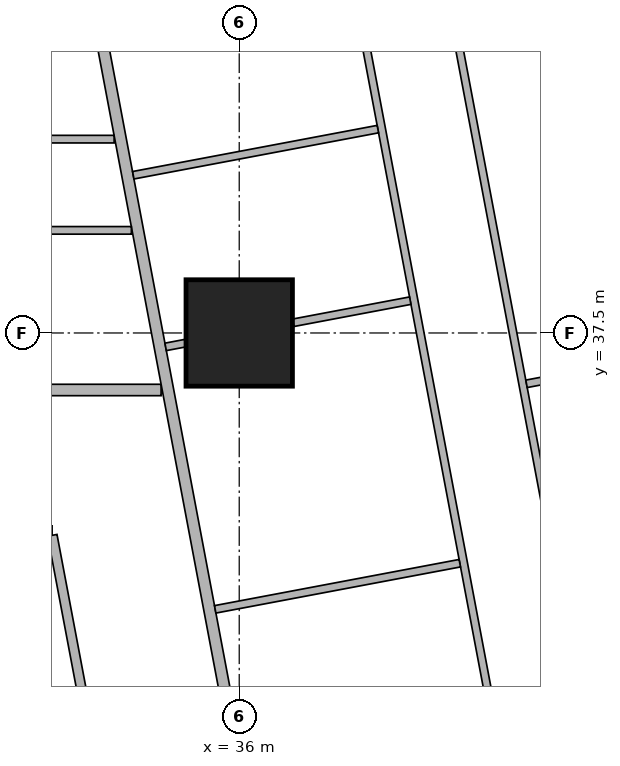
"""IFC4 building model, lengths in metres.
Left out: names, types, materials, properties, quantities, classifications, styles, units other than length and angle.
Written with IfcOpenShell. Run it as: python <this file> out.ifc"""

import sys

from ifc_helpers import new_model, si_unit, direction, frame, frame_2d, origin, origin_2d, place, context, subcontext, project, spatial, rectangle, extrude, element, fill, save


model = new_model("IFC4")
c1 = context("Model", 3, precision=1e-05, world=origin(), true_north=direction((0.0, 1.0)))
c2 = subcontext(c1, "Body", "Model", "MODEL_VIEW")
j1 = project(units=[si_unit("LENGTHUNIT", "METRE"), si_unit("PLANEANGLEUNIT", "RADIAN")], contexts=[c1])
p1 = place(None, origin())
s1 = spatial("IfcSite", under=j1, at=p1, CompositionType="ELEMENT")
p2 = place(p1, origin())
s2 = spatial("IfcBuilding", under=s1, at=p2, CompositionType="ELEMENT")
p3 = place(p2, frame((0.0, 0.0, 262.85)))
s3 = spatial("IfcBuildingStorey", under=s2, at=p3, CompositionType="ELEMENT", Elevation=262.85)
p4 = place(p3, frame((36.0, 37.5, 0.0), z_axis=(0.0, 0.0, 1.0), x_axis=(1.0, 0.0, 0.0)))
e1 = element("IfcColumn", 1, at=p4, inside=s3, PredefinedType="COLUMN", context=c2, shape_type="SweptSolid", body=[
    extrude(rectangle(XDim=1.4, YDim=1.4, at=origin_2d()), origin(), (0.0, 0.0, 1.0), 3.75),
])
p5 = place(p3, frame((29.501, 36.75, 0.0), z_axis=(0.0, 0.0, 1.0), x_axis=(1.0, 0.0, 0.0)))
e2 = element("IfcWall", 2, at=p5, inside=s3, PredefinedType="SOLIDWALL", context=c2, shape_type="SweptSolid", body=[
    extrude(rectangle(XDim=5.471, YDim=0.15, at=frame_2d((2.735, 0.0))), origin(), (0.0, 0.0, 1.0), 3.5),
])
p6 = place(p3, frame((34.036, 42.186, 0.0), z_axis=(0.0, 0.0, 1.0), x_axis=(0.185593518645, -0.9826266055, 0.0)))
e3 = element("IfcWall", 3, at=p6, inside=s3, PredefinedType="SOLIDWALL", context=c2, shape_type="SweptSolid", body=[
    extrude(rectangle(XDim=35.961, YDim=0.15, at=frame_2d((17.98, 0.0))), origin(), (0.0, 0.0, 1.0), 2.5),
])
p7 = place(p6, frame((15.529, 0.0, 0.0)))
e4 = element("IfcOpeningElement", 4, at=p7, cuts=e3, PredefinedType="OPENING", context=c2, shape_type="SweptSolid", body=[
    extrude(rectangle(XDim=1.0, YDim=2.1, at=frame_2d((0.5, 1.05))), frame((0.0, 0.085, 0.0), z_axis=(0.0, -1.0, 0.0), x_axis=(1.0, 0.0, 0.0)), (0.0, 0.0, 1.0), 0.17),
])
p8 = place(p6, frame((19.345, 0.0, 0.0)))
e5 = element("IfcOpeningElement", 5, at=p8, cuts=e3, PredefinedType="OPENING", context=c2, shape_type="SweptSolid", body=[
    extrude(rectangle(XDim=1.0, YDim=2.1, at=frame_2d((0.5, 1.05))), frame((0.0, 0.085, 0.0), z_axis=(0.0, -1.0, 0.0), x_axis=(1.0, 0.0, 0.0)), (0.0, 0.0, 1.0), 0.17),
])
p9 = place(p6, frame((30.594, 0.0, 0.0)))
e6 = element("IfcOpeningElement", 6, at=p9, cuts=e3, PredefinedType="OPENING", context=c2, shape_type="SweptSolid", body=[
    extrude(rectangle(XDim=1.0, YDim=2.1, at=frame_2d((0.5, 1.05))), frame((0.0, 0.085, 0.0), z_axis=(0.0, -1.0, 0.0), x_axis=(1.0, 0.0, 0.0)), (0.0, 0.0, 1.0), 0.17),
])
p10 = place(p3, frame((38.744, 42.045, 0.0), z_axis=(0.0, 0.0, 1.0), x_axis=(0.185614085367, -0.982622720739, 0.0)))
e7 = element("IfcWall", 7, at=p10, inside=s3, PredefinedType="PARTITIONING", context=c2, shape_type="SweptSolid", body=[
    extrude(rectangle(XDim=12.898, YDim=0.1, at=frame_2d((6.449, 0.0))), origin(), (0.0, 0.0, 1.0), 2.5),
])
p11 = place(p10, frame((11.848, 0.0, 0.0)))
e8 = element("IfcOpeningElement", 8, at=p11, cuts=e7, PredefinedType="OPENING", context=c2, shape_type="SweptSolid", body=[
    extrude(rectangle(XDim=0.9, YDim=2.1, at=frame_2d((0.45, 1.05))), frame((0.0, 0.06, 0.0), z_axis=(0.0, -1.0, 0.0), x_axis=(1.0, 0.0, 0.0)), (0.0, 0.0, 1.0), 0.12),
])
p12 = place(p10, frame((8.191, 0.0, 0.0)))
e9 = element("IfcOpeningElement", 9, at=p12, cuts=e7, PredefinedType="OPENING", context=c2, shape_type="SweptSolid", body=[
    extrude(rectangle(XDim=0.9, YDim=2.1, at=frame_2d((0.45, 1.05))), frame((0.0, 0.06, 0.0), z_axis=(0.0, -1.0, 0.0), x_axis=(1.0, 0.0, 0.0)), (0.0, 0.0, 1.0), 0.12),
])
p13 = place(p10, frame((4.215, 0.0, 0.0)))
e10 = element("IfcOpeningElement", 10, at=p13, cuts=e7, PredefinedType="OPENING", context=c2, shape_type="SweptSolid", body=[
    extrude(rectangle(XDim=0.9, YDim=2.1, at=frame_2d((0.45, 1.05))), frame((0.0, 0.06, 0.0), z_axis=(0.0, -1.0, 0.0), x_axis=(1.0, 0.0, 0.0)), (0.0, 0.0, 1.0), 0.12),
])
p14 = place(p3, frame((37.511, 42.109, 0.0), z_axis=(0.0, 0.0, 1.0), x_axis=(0.185550464988, -0.982634736279, 0.0)))
e11 = element("IfcWall", 11, at=p14, inside=s3, PredefinedType="PARTITIONING", context=c2, shape_type="SweptSolid", body=[
    extrude(rectangle(XDim=13.35, YDim=0.1, at=frame_2d((6.675, 0.0))), origin(), (0.0, 0.0, 1.0), 2.5),
])
p15 = place(p14, frame((11.845, 0.0, 0.0)))
e12 = element("IfcOpeningElement", 12, at=p15, cuts=e11, PredefinedType="OPENING", context=c2, shape_type="SweptSolid", body=[
    extrude(rectangle(XDim=0.9, YDim=2.1, at=frame_2d((0.45, 1.05))), frame((0.0, 0.06, 0.0), z_axis=(0.0, -1.0, 0.0), x_axis=(1.0, 0.0, 0.0)), (0.0, 0.0, 1.0), 0.12),
])
p16 = place(p14, frame((8.224, 0.0, 0.0)))
e13 = element("IfcOpeningElement", 13, at=p16, cuts=e11, PredefinedType="OPENING", context=c2, shape_type="SweptSolid", body=[
    extrude(rectangle(XDim=0.9, YDim=2.1, at=frame_2d((0.45, 1.05))), frame((0.0, 0.06, 0.0), z_axis=(0.0, -1.0, 0.0), x_axis=(1.0, 0.0, 0.0)), (0.0, 0.0, 1.0), 0.12),
])
p17 = place(p14, frame((2.65, 0.0, 0.0)))
e14 = element("IfcOpeningElement", 14, at=p17, cuts=e11, PredefinedType="OPENING", context=c2, shape_type="SweptSolid", body=[
    extrude(rectangle(XDim=0.9, YDim=2.1, at=frame_2d((0.45, 1.05))), frame((0.0, 0.06, 0.0), z_axis=(0.0, -1.0, 0.0), x_axis=(1.0, 0.0, 0.0)), (0.0, 0.0, 1.0), 0.12),
])
p18 = place(p14, frame((9.936, 0.0, 0.0)))
e15 = element("IfcOpeningElement", 15, at=p18, cuts=e11, PredefinedType="OPENING", context=c2, shape_type="SweptSolid", body=[
    extrude(rectangle(XDim=0.9, YDim=2.1, at=frame_2d((0.45, 1.05))), frame((0.0, 0.06, 0.0), z_axis=(0.0, -1.0, 0.0), x_axis=(1.0, 0.0, 0.0)), (0.0, 0.0, 1.0), 0.12),
])
p19 = place(p14, frame((5.555, 0.0, 0.0)))
e16 = element("IfcOpeningElement", 16, at=p19, cuts=e11, PredefinedType="OPENING", context=c2, shape_type="SweptSolid", body=[
    extrude(rectangle(XDim=0.9, YDim=2.1, at=frame_2d((0.45, 1.05))), frame((0.0, 0.06, 0.0), z_axis=(0.0, -1.0, 0.0), x_axis=(1.0, 0.0, 0.0)), (0.0, 0.0, 1.0), 0.12),
])
p20 = place(p3, frame((41.054, 37.072, 0.0), z_axis=(0.0, 0.0, 1.0), x_axis=(-0.982576752117, -0.185857273733, 0.0)))
e17 = element("IfcWall", 17, at=p20, inside=s3, PredefinedType="PARTITIONING", context=c2, shape_type="SweptSolid", body=[
    extrude(rectangle(XDim=1.297, YDim=0.1, at=frame_2d((0.648, 0.0))), origin(), (0.0, 0.0, 1.0), 3.5),
])
p21 = place(p3, frame((37.824, 40.182, 0.0), z_axis=(0.0, 0.0, 1.0), x_axis=(-0.982674977865, -0.185337227447, 0.0)))
e18 = element("IfcWall", 18, at=p21, inside=s3, PredefinedType="PARTITIONING", context=c2, shape_type="SweptSolid", body=[
    extrude(rectangle(XDim=3.275, YDim=0.1, at=frame_2d((1.637, 0.0))), origin(), (0.0, 0.0, 1.0), 3.5),
])
p22 = place(p3, frame((38.25, 37.925, 0.0), z_axis=(0.0, 0.0, 1.0), x_axis=(-0.982610209589, -0.185680305934, 0.0)))
e19 = element("IfcWall", 19, at=p22, inside=s3, PredefinedType="PARTITIONING", context=c2, shape_type="SweptSolid", body=[
    extrude(rectangle(XDim=1.567, YDim=0.1, at=frame_2d((0.784, 0.0))), origin(), (0.0, 0.0, 1.0), 3.5),
])
p23 = place(p3, frame((35.29, 37.366, 0.0), z_axis=(0.0, 0.0, 1.0), x_axis=(-0.982395465615, -0.18681313963, 0.0)))
e20 = element("IfcWall", 20, at=p23, inside=s3, PredefinedType="PARTITIONING", context=c2, shape_type="SweptSolid", body=[
    extrude(rectangle(XDim=0.263, YDim=0.1, at=frame_2d((0.131, 0.0))), origin(), (0.0, 0.0, 1.0), 3.5),
])
p24 = place(p3, frame((38.902, 34.471, 0.0), z_axis=(0.0, 0.0, 1.0), x_axis=(-0.982674977865, -0.185337227447, 0.0)))
e21 = element("IfcWall", 21, at=p24, inside=s3, PredefinedType="PARTITIONING", context=c2, shape_type="SweptSolid", body=[
    extrude(rectangle(XDim=3.275, YDim=0.1, at=frame_2d((1.637, 0.0))), origin(), (0.0, 0.0, 1.0), 3.5),
])
p25 = place(p3, frame((21.6, 40.05, 0.0), z_axis=(0.0, 0.0, 1.0), x_axis=(1.0, 0.0, 0.0)))
e22 = element("IfcWall", 22, at=p25, inside=s3, PredefinedType="PARTITIONING", context=c2, shape_type="SweptSolid", body=[
    extrude(rectangle(XDim=12.754, YDim=0.1, at=frame_2d((6.377, 0.0))), origin(), (0.0, 0.0, 1.0), 3.5),
])
p26 = place(p25, frame((0.2, 0.0, 0.0)))
e23 = element("IfcOpeningElement", 23, at=p26, cuts=e22, PredefinedType="OPENING", context=c2, shape_type="SweptSolid", body=[
    extrude(rectangle(XDim=0.9, YDim=2.1, at=frame_2d((0.45, 1.05))), frame((0.0, 0.06, 0.0), z_axis=(0.0, -1.0, 0.0), x_axis=(1.0, 0.0, 0.0)), (0.0, 0.0, 1.0), 0.12),
])
p27 = place(p25, frame((3.8, 0.0, 0.0)))
e24 = element("IfcOpeningElement", 24, at=p27, cuts=e22, PredefinedType="OPENING", context=c2, shape_type="SweptSolid", body=[
    extrude(rectangle(XDim=0.9, YDim=2.1, at=frame_2d((0.45, 1.05))), frame((0.0, 0.06, 0.0), z_axis=(0.0, -1.0, 0.0), x_axis=(1.0, 0.0, 0.0)), (0.0, 0.0, 1.0), 0.12),
])
p28 = place(p25, frame((7.4, 0.0, 0.0)))
e25 = element("IfcOpeningElement", 25, at=p28, cuts=e22, PredefinedType="OPENING", context=c2, shape_type="SweptSolid", body=[
    extrude(rectangle(XDim=0.9, YDim=2.1, at=frame_2d((0.45, 1.05))), frame((0.0, 0.06, 0.0), z_axis=(0.0, -1.0, 0.0), x_axis=(1.0, 0.0, 0.0)), (0.0, 0.0, 1.0), 0.12),
])
p29 = place(p3, frame((21.6, 38.85, 0.0), z_axis=(0.0, 0.0, 1.0), x_axis=(1.0, 0.0, 0.0)))
e26 = element("IfcWall", 26, at=p29, inside=s3, PredefinedType="PARTITIONING", context=c2, shape_type="SweptSolid", body=[
    extrude(rectangle(XDim=12.981, YDim=0.1, at=frame_2d((6.49, 0.0))), origin(), (0.0, 0.0, 1.0), 3.5),
])
p30 = place(p29, frame((1.35, 0.0, 0.0)))
e27 = element("IfcOpeningElement", 27, at=p30, cuts=e26, PredefinedType="OPENING", context=c2, shape_type="SweptSolid", body=[
    extrude(rectangle(XDim=0.9, YDim=2.1, at=frame_2d((0.45, 1.05))), frame((0.0, 0.06, 0.0), z_axis=(0.0, -1.0, 0.0), x_axis=(1.0, 0.0, 0.0)), (0.0, 0.0, 1.0), 0.12),
])
p31 = place(p29, frame((5.55, 0.0, 0.0)))
e28 = element("IfcOpeningElement", 28, at=p31, cuts=e26, PredefinedType="OPENING", context=c2, shape_type="SweptSolid", body=[
    extrude(rectangle(XDim=0.9, YDim=2.1, at=frame_2d((0.45, 1.05))), frame((0.0, 0.06, 0.0), z_axis=(0.0, -1.0, 0.0), x_axis=(1.0, 0.0, 0.0)), (0.0, 0.0, 1.0), 0.12),
])
p32 = place(p29, frame((8.55, 0.0, 0.0)))
e29 = element("IfcOpeningElement", 29, at=p32, cuts=e26, PredefinedType="OPENING", context=c2, shape_type="SweptSolid", body=[
    extrude(rectangle(XDim=0.9, YDim=2.1, at=frame_2d((0.45, 1.05))), frame((0.0, 0.06, 0.0), z_axis=(0.0, -1.0, 0.0), x_axis=(1.0, 0.0, 0.0)), (0.0, 0.0, 1.0), 0.12),
])
p33 = place(p29, frame((11.681, 0.0, 0.0)))
e30 = element("IfcOpeningElement", 30, at=p33, cuts=e26, PredefinedType="OPENING", context=c2, shape_type="SweptSolid", body=[
    extrude(rectangle(XDim=0.9, YDim=2.1, at=frame_2d((0.45, 1.05))), frame((0.0, 0.06, 0.0), z_axis=(0.0, -1.0, 0.0), x_axis=(1.0, 0.0, 0.0)), (0.0, 0.0, 1.0), 0.12),
])
p34 = place(p3, frame((28.95, 34.9, 0.0), z_axis=(0.0, 0.0, 1.0), x_axis=(1.0, 0.0, 0.0)))
e31 = element("IfcWall", 31, at=p34, inside=s3, PredefinedType="PARTITIONING", context=c2, shape_type="SweptSolid", body=[
    extrude(rectangle(XDim=4.588, YDim=0.125, at=frame_2d((2.294, 0.0))), origin(), (0.0, 0.0, 1.0), 3.5),
])
p35 = place(p3, frame((38.202, 10.163, 0.0), z_axis=(0.0, 0.0, 1.0), x_axis=(-0.185610321132, 0.982623431783, 0.0)))
e32 = element("IfcWall", 32, at=p35, inside=s3, PredefinedType="PARTITIONING", context=c2, shape_type="SweptSolid", body=[
    extrude(rectangle(XDim=25.111, YDim=0.125, at=frame_2d((12.556, 0.0))), origin(), (0.0, 0.0, 1.0), 2.5),
])
p36 = place(p35, frame((0.708, 0.0, 0.0)))
e33 = element("IfcOpeningElement", 33, at=p36, cuts=e32, PredefinedType="OPENING", context=c2, shape_type="SweptSolid", body=[
    extrude(rectangle(XDim=1.0, YDim=2.1, at=frame_2d((0.5, 1.05))), frame((0.0, 0.073, 0.0), z_axis=(0.0, -1.0, 0.0), x_axis=(1.0, 0.0, 0.0)), (0.0, 0.0, 1.0), 0.145),
])
p37 = place(p35, frame((5.9, 0.0, 0.0)))
e34 = element("IfcOpeningElement", 34, at=p37, cuts=e32, PredefinedType="OPENING", context=c2, shape_type="SweptSolid", body=[
    extrude(rectangle(XDim=1.0, YDim=2.1, at=frame_2d((0.5, 1.05))), frame((0.0, 0.073, 0.0), z_axis=(0.0, -1.0, 0.0), x_axis=(1.0, 0.0, 0.0)), (0.0, 0.0, 1.0), 0.145),
])
p38 = place(p35, frame((13.378, 0.0, 0.0)))
e35 = element("IfcOpeningElement", 35, at=p38, cuts=e32, PredefinedType="OPENING", context=c2, shape_type="SweptSolid", body=[
    extrude(rectangle(XDim=1.0, YDim=2.1, at=frame_2d((0.5, 1.05))), frame((0.0, 0.073, 0.0), z_axis=(0.0, -1.0, 0.0), x_axis=(1.0, 0.0, 0.0)), (0.0, 0.0, 1.0), 0.145),
])
p39 = place(p35, frame((17.194, 0.0, 0.0)))
e36 = element("IfcOpeningElement", 36, at=p39, cuts=e32, PredefinedType="OPENING", context=c2, shape_type="SweptSolid", body=[
    extrude(rectangle(XDim=1.0, YDim=2.1, at=frame_2d((0.5, 1.05))), frame((0.0, 0.073, 0.0), z_axis=(0.0, -1.0, 0.0), x_axis=(1.0, 0.0, 0.0)), (0.0, 0.0, 1.0), 0.145),
])
p40 = place(p35, frame((21.15, 0.0, 0.0)))
e37 = element("IfcOpeningElement", 37, at=p40, cuts=e32, PredefinedType="OPENING", context=c2, shape_type="SweptSolid", body=[
    extrude(rectangle(XDim=1.0, YDim=2.1, at=frame_2d((0.5, 1.05))), frame((0.0, 0.073, 0.0), z_axis=(0.0, -1.0, 0.0), x_axis=(1.0, 0.0, 0.0)), (0.0, 0.0, 1.0), 0.145),
])
p41 = place(p13, origin())
e38 = element("IfcDoor", 38, at=p41, inside=s3, OperationType="SINGLE_SWING_RIGHT", PredefinedType="DOOR", context=c2, shape_type="SweptSolid", body=[
    extrude(rectangle(XDim=0.9, YDim=2.1, at=frame_2d((0.45, 1.05))), frame((0.0, 0.025, 0.0), z_axis=(0.0, -1.0, 0.0), x_axis=(1.0, 0.0, 0.0)), (0.0, 0.0, 1.0), 0.05),
])
fill(e10, e38)
p42 = place(p16, origin())
e39 = element("IfcDoor", 39, at=p42, inside=s3, OperationType="SINGLE_SWING_RIGHT", PredefinedType="DOOR", context=c2, shape_type="SweptSolid", body=[
    extrude(rectangle(XDim=0.9, YDim=2.1, at=frame_2d((0.45, 1.05))), frame((0.0, 0.025, 0.0), z_axis=(0.0, -1.0, 0.0), x_axis=(1.0, 0.0, 0.0)), (0.0, 0.0, 1.0), 0.05),
])
fill(e13, e39)
p43 = place(p17, origin())
e40 = element("IfcDoor", 40, at=p43, inside=s3, OperationType="SINGLE_SWING_RIGHT", PredefinedType="DOOR", context=c2, shape_type="SweptSolid", body=[
    extrude(rectangle(XDim=0.9, YDim=2.1, at=frame_2d((0.45, 1.05))), frame((0.0, 0.025, 0.0), z_axis=(0.0, -1.0, 0.0), x_axis=(1.0, 0.0, 0.0)), (0.0, 0.0, 1.0), 0.05),
])
fill(e14, e40)
p44 = place(p19, origin())
e41 = element("IfcDoor", 41, at=p44, inside=s3, OperationType="SINGLE_SWING_LEFT", PredefinedType="DOOR", context=c2, shape_type="SweptSolid", body=[
    extrude(rectangle(XDim=0.9, YDim=2.1, at=frame_2d((0.45, 1.05))), frame((0.0, 0.025, 0.0), z_axis=(0.0, -1.0, 0.0), x_axis=(1.0, 0.0, 0.0)), (0.0, 0.0, 1.0), 0.05),
])
fill(e16, e41)
p45 = place(p33, origin())
e42 = element("IfcDoor", 42, at=p45, inside=s3, OperationType="SINGLE_SWING_LEFT", PredefinedType="DOOR", context=c2, shape_type="SweptSolid", body=[
    extrude(rectangle(XDim=0.9, YDim=2.1, at=frame_2d((0.45, 1.05))), frame((0.0, 0.025, 0.0), z_axis=(0.0, -1.0, 0.0), x_axis=(1.0, 0.0, 0.0)), (0.0, 0.0, 1.0), 0.05),
])
fill(e30, e42)
save(model, sys.argv[1])
